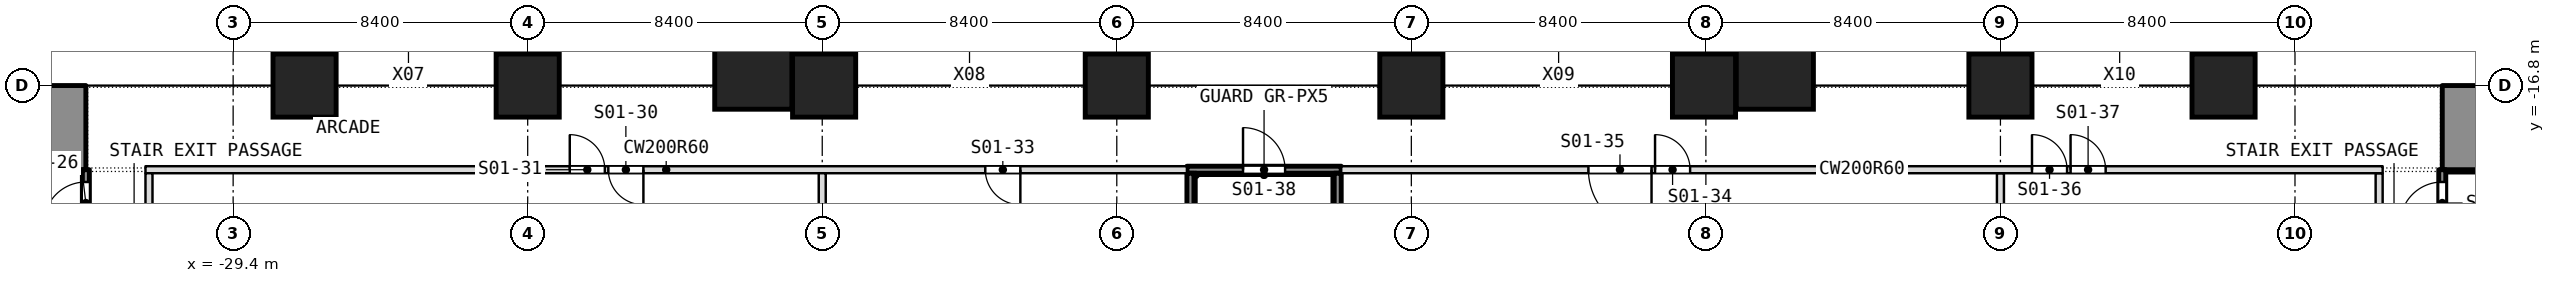
"""IFC4 building model, lengths in metres.
Left out: names, types, materials, properties, quantities, classifications, styles, units other than length and angle.
Written with IfcOpenShell. Run it as: python <this file> out.ifc"""

import sys

from ifc_helpers import new_model, si_unit, direction, frame, frame_2d, origin, origin_2d, place, context, subcontext, project, spatial, rectangle, extrude, element, fill, save


model = new_model("IFC4")
c1 = context("Model", 3, precision=1e-05, world=origin(), true_north=direction((0.0, 1.0)))
c2 = subcontext(c1, "Body", "Model", "MODEL_VIEW")
j1 = project(units=[si_unit("LENGTHUNIT", "METRE"), si_unit("PLANEANGLEUNIT", "RADIAN")], contexts=[c1])
p1 = place(None, origin())
s1 = spatial("IfcSite", under=j1, at=p1, CompositionType="ELEMENT")
p2 = place(p1, origin())
s2 = spatial("IfcBuilding", under=s1, at=p2, CompositionType="ELEMENT")
p3 = place(p2, origin())
s3 = spatial("IfcBuildingStorey", under=s2, at=p3, CompositionType="ELEMENT", Elevation=0.0)
for number, where, z_axis, x_axis in (
    (1, (-21.0, -16.8, -0.3), (0.0, 0.0, 1.0), (1.0, 0.0, 0.0)),
    (2, (-12.546, -16.8, -0.3), (0.0, 0.0, 1.0), (1.0, 0.0, 0.0)),
    (3, (-4.2, -16.8, -0.3), (0.0, 0.0, 1.0), (1.0, 0.0, 0.0)),
    (4, (4.2, -16.8, -0.3), (0.0, 0.0, 1.0), (1.0, 0.0, 0.0)),
    (5, (12.546, -16.8, -0.3), (0.0, 0.0, 1.0), (1.0, 0.0, 0.0)),
    (6, (21.0, -16.8, -0.3), (0.0, 0.0, 1.0), (1.0, 0.0, 0.0)),
    (7, (-27.363, -16.8, -0.3), (0.0, 0.0, 1.0), (1.0, 0.0, 0.0)),
    (8, (27.363, -16.8, -0.3), (0.0, 0.0, 1.0), (1.0, 0.0, 0.0)),
):
    element("IfcColumn", number, at=place(p3, frame(where, z_axis=z_axis, x_axis=x_axis)), inside=s3, PredefinedType="COLUMN", context=c2, shape_type="SweptSolid", body=[
        extrude(rectangle(XDim=1.8, YDim=1.8, at=origin_2d()), origin(), (0.0, 0.0, 1.0), 8.3),
    ])
for number, where, z_axis, x_axis in (
    (9, (-14.566, -16.375, -0.3), (0.0, 0.0, 1.0), (1.0, 0.0, 0.0)),
    (10, (14.566, -16.375, -0.3), (0.0, 0.0, 1.0), (1.0, 0.0, 0.0)),
):
    element("IfcColumn", number, at=place(p3, frame(where, z_axis=z_axis, x_axis=x_axis)), inside=s3, PredefinedType="COLUMN", context=c2, shape_type="SweptSolid", body=[
        extrude(rectangle(XDim=2.2, YDim=2.2, at=origin_2d()), origin(), (0.0, 0.0, 1.0), 8.3),
    ])
for number, where, z_axis, x_axis in (
    (11, (-37.8, -18.0, -0.3), (0.0, 0.0, 1.0), (1.0, 0.0, 0.0)),
    (12, (33.6, -18.0, -0.3), (0.0, 0.0, 1.0), (1.0, 0.0, 0.0)),
):
    element("IfcWall", number, at=place(p3, frame(where, z_axis=z_axis, x_axis=x_axis)), inside=s3, PredefinedType="SOLIDWALL", context=c2, shape_type="SweptSolid", body=[
        extrude(rectangle(XDim=4.2, YDim=2.4, at=frame_2d((2.1, 0.0))), origin(), (0.0, 0.0, 1.0), 8.3),
    ])
p4 = place(p3, frame((33.6, -22.3, 0.0), z_axis=(0.0, 0.0, 1.0), x_axis=(0.0, 1.0, 0.0)))
e13 = element("IfcWall", 13, at=p4, inside=s3, PredefinedType="PARTITIONING", context=c2, shape_type="SweptSolid", body=[
    extrude(rectangle(XDim=3.1, YDim=0.2, at=frame_2d((1.55, 0.0))), origin(), (0.0, 0.0, 1.0), 7.68),
])
p5 = place(p4, frame((1.55, 0.0, 0.0)))
e14 = element("IfcOpeningElement", 14, at=p5, cuts=e13, PredefinedType="OPENING", context=c2, shape_type="SweptSolid", body=[
    extrude(rectangle(XDim=1.2, YDim=2.1, at=frame_2d((0.6, 1.05))), frame((0.0, 0.1, 0.0), z_axis=(0.0, -1.0, 0.0), x_axis=(1.0, 0.0, 0.0)), (0.0, 0.0, 1.0), 0.2),
])
p6 = place(p3, frame((31.8, -22.1, 0.0), z_axis=(0.0, 0.0, 1.0), x_axis=(0.0, 1.0, 0.0)))
e15 = element("IfcWall", 15, at=p6, inside=s3, PredefinedType="PARTITIONING", context=c2, shape_type="SweptSolid", body=[
    extrude(rectangle(XDim=2.8, YDim=0.2, at=frame_2d((1.4, 0.0))), origin(), (0.0, 0.0, 1.0), 7.68),
])
p7 = place(p3, frame((21.0, -25.889, 0.0), z_axis=(0.0, 0.0, 1.0), x_axis=(0.0, 1.0, 0.0)))
e16 = element("IfcWall", 16, at=p7, inside=s3, PredefinedType="PARTITIONING", context=c2, shape_type="SweptSolid", body=[
    extrude(rectangle(XDim=6.589, YDim=0.2, at=frame_2d((3.294, 0.0))), origin(), (0.0, 0.0, 1.0), 7.68),
])
p8 = place(p3, frame((-31.9, -19.2, 0.0), z_axis=(0.0, 0.0, 1.0), x_axis=(1.0, 0.0, 0.0)))
e17 = element("IfcWall", 17, at=p8, inside=s3, PredefinedType="PARTITIONING", context=c2, shape_type="SweptSolid", body=[
    extrude(rectangle(XDim=29.7, YDim=0.2, at=frame_2d((14.85, 0.0))), origin(), (0.0, 0.0, 1.0), 7.68),
])
p9 = place(p8, frame((13.2, 0.0, 0.0)))
e18 = element("IfcOpeningElement", 18, at=p9, cuts=e17, PredefinedType="OPENING", context=c2, shape_type="SweptSolid", body=[
    extrude(rectangle(XDim=1.0, YDim=2.1, at=frame_2d((0.5, 1.05))), frame((0.0, 0.1, 0.0), z_axis=(0.0, -1.0, 0.0), x_axis=(1.0, 0.0, 0.0)), (0.0, 0.0, 1.0), 0.2),
])
p10 = place(p8, frame((12.1, 0.0, 0.0)))
e19 = element("IfcOpeningElement", 19, at=p10, cuts=e17, PredefinedType="OPENING", context=c2, shape_type="SweptSolid", body=[
    extrude(rectangle(XDim=1.0, YDim=2.1, at=frame_2d((0.5, 1.05))), frame((0.0, 0.1, 0.0), z_axis=(0.0, -1.0, 0.0), x_axis=(1.0, 0.0, 0.0)), (0.0, 0.0, 1.0), 0.2),
])
p11 = place(p8, frame((23.95, 0.0, 0.0)))
e20 = element("IfcOpeningElement", 20, at=p11, cuts=e17, PredefinedType="OPENING", context=c2, shape_type="SweptSolid", body=[
    extrude(rectangle(XDim=1.0, YDim=2.1, at=frame_2d((0.5, 1.05))), frame((0.0, 0.1, 0.0), z_axis=(0.0, -1.0, 0.0), x_axis=(1.0, 0.0, 0.0)), (0.0, 0.0, 1.0), 0.2),
])
p12 = place(p3, frame((2.2, -19.2, 0.0), z_axis=(0.0, 0.0, 1.0), x_axis=(1.0, 0.0, 0.0)))
e21 = element("IfcWall", 21, at=p12, inside=s3, PredefinedType="PARTITIONING", context=c2, shape_type="SweptSolid", body=[
    extrude(rectangle(XDim=29.7, YDim=0.2, at=frame_2d((14.85, 0.0))), origin(), (0.0, 0.0, 1.0), 7.68),
])
p13 = place(p12, frame((8.95, 0.0, 0.0)))
e22 = element("IfcOpeningElement", 22, at=p13, cuts=e21, PredefinedType="OPENING", context=c2, shape_type="SweptSolid", body=[
    extrude(rectangle(XDim=1.0, YDim=2.1, at=frame_2d((0.5, 1.05))), frame((0.0, 0.1, 0.0), z_axis=(0.0, -1.0, 0.0), x_axis=(1.0, 0.0, 0.0)), (0.0, 0.0, 1.0), 0.2),
])
p14 = place(p12, frame((7.05, 0.0, 0.0)))
e23 = element("IfcOpeningElement", 23, at=p14, cuts=e21, PredefinedType="OPENING", context=c2, shape_type="SweptSolid", body=[
    extrude(rectangle(XDim=1.8, YDim=2.1, at=frame_2d((0.9, 1.05))), frame((0.0, 0.1, 0.0), z_axis=(0.0, -1.0, 0.0), x_axis=(1.0, 0.0, 0.0)), (0.0, 0.0, 1.0), 0.2),
])
p15 = place(p12, frame((19.7, 0.0, 0.0)))
e24 = element("IfcOpeningElement", 24, at=p15, cuts=e21, PredefinedType="OPENING", context=c2, shape_type="SweptSolid", body=[
    extrude(rectangle(XDim=1.0, YDim=2.1, at=frame_2d((0.5, 1.05))), frame((0.0, 0.1, 0.0), z_axis=(0.0, -1.0, 0.0), x_axis=(1.0, 0.0, 0.0)), (0.0, 0.0, 1.0), 0.2),
])
p16 = place(p12, frame((20.8, 0.0, 0.0)))
e25 = element("IfcOpeningElement", 25, at=p16, cuts=e21, PredefinedType="OPENING", context=c2, shape_type="SweptSolid", body=[
    extrude(rectangle(XDim=1.0, YDim=2.1, at=frame_2d((0.5, 1.05))), frame((0.0, 0.1, 0.0), z_axis=(0.0, -1.0, 0.0), x_axis=(1.0, 0.0, 0.0)), (0.0, 0.0, 1.0), 0.2),
])
p17 = place(p3, frame((-2.2, -19.2, 0.0), z_axis=(0.0, 0.0, 1.0), x_axis=(1.0, 0.0, 0.0)))
e26 = element("IfcWall", 26, at=p17, inside=s3, PredefinedType="PARTITIONING", context=c2, shape_type="SweptSolid", body=[
    extrude(rectangle(XDim=4.4, YDim=0.2, at=frame_2d((2.2, 0.0))), origin(), (0.0, 0.0, 1.0), 7.68),
])
p18 = place(p17, frame((1.6, 0.0, 0.0)))
e27 = element("IfcOpeningElement", 27, at=p18, cuts=e26, PredefinedType="OPENING", context=c2, shape_type="SweptSolid", body=[
    extrude(rectangle(XDim=1.2, YDim=2.1, at=frame_2d((0.6, 1.05))), frame((0.0, 0.1, 0.0), z_axis=(0.0, -1.0, 0.0), x_axis=(1.0, 0.0, 0.0)), (0.0, 0.0, 1.0), 0.2),
])
for number, where, z_axis, x_axis in (
    (28, (2.1, -25.889, 0.0), (0.0, 0.0, 1.0), (0.0, 1.0, 0.0)),
    (29, (-2.1, -25.889, 0.0), (0.0, 0.0, 1.0), (0.0, 1.0, 0.0)),
    (30, (-12.6, -25.889, 0.0), (0.0, 0.0, 1.0), (0.0, 1.0, 0.0)),
):
    element("IfcWall", number, at=place(p3, frame(where, z_axis=z_axis, x_axis=x_axis)), inside=s3, PredefinedType="PARTITIONING", context=c2, shape_type="SweptSolid", body=[
        extrude(rectangle(XDim=6.589, YDim=0.2, at=frame_2d((3.294, 0.0))), origin(), (0.0, 0.0, 1.0), 7.68),
    ])
p19 = place(p3, frame((-31.8, -22.1, 0.0), z_axis=(0.0, 0.0, 1.0), x_axis=(0.0, 1.0, 0.0)))
e31 = element("IfcWall", 31, at=p19, inside=s3, PredefinedType="PARTITIONING", context=c2, shape_type="SweptSolid", body=[
    extrude(rectangle(XDim=2.8, YDim=0.2, at=frame_2d((1.4, 0.0))), origin(), (0.0, 0.0, 1.0), 7.68),
])
p20 = place(p3, frame((-33.6, -22.3, 0.0), z_axis=(0.0, 0.0, 1.0), x_axis=(0.0, 1.0, 0.0)))
e32 = element("IfcWall", 32, at=p20, inside=s3, PredefinedType="PARTITIONING", context=c2, shape_type="SweptSolid", body=[
    extrude(rectangle(XDim=3.1, YDim=0.2, at=frame_2d((1.55, 0.0))), origin(), (0.0, 0.0, 1.0), 7.68),
])
p21 = place(p20, frame((1.55, 0.0, 0.0)))
e33 = element("IfcOpeningElement", 33, at=p21, cuts=e32, PredefinedType="OPENING", context=c2, shape_type="SweptSolid", body=[
    extrude(rectangle(XDim=1.2, YDim=2.1, at=frame_2d((0.6, 1.05))), frame((0.0, 0.1, 0.0), z_axis=(0.0, -1.0, 0.0), x_axis=(1.0, 0.0, 0.0)), (0.0, 0.0, 1.0), 0.2),
])
p22 = place(p5, origin())
e34 = element("IfcDoor", 34, at=p22, inside=s3, OperationType="SINGLE_SWING_LEFT", PredefinedType="DOOR", context=c2, shape_type="SweptSolid", body=[
    extrude(rectangle(XDim=1.2, YDim=2.1, at=frame_2d((0.6, 1.05))), frame((0.0, 0.025, 0.0), z_axis=(0.0, -1.0, 0.0), x_axis=(1.0, 0.0, 0.0)), (0.0, 0.0, 1.0), 0.05),
])
fill(e14, e34)
p23 = place(p9, origin())
e35 = element("IfcDoor", 35, at=p23, inside=s3, OperationType="SINGLE_SWING_LEFT", PredefinedType="DOOR", context=c2, shape_type="SweptSolid", body=[
    extrude(rectangle(XDim=1.0, YDim=2.1, at=frame_2d((0.5, 1.05))), frame((0.0, 0.025, 0.0), z_axis=(0.0, -1.0, 0.0), x_axis=(1.0, 0.0, 0.0)), (0.0, 0.0, 1.0), 0.05),
])
fill(e18, e35)
p24 = place(p10, origin())
e36 = element("IfcDoor", 36, at=p24, inside=s3, OperationType="SINGLE_SWING_LEFT", PredefinedType="DOOR", context=c2, shape_type="SweptSolid", body=[
    extrude(rectangle(XDim=1.0, YDim=2.1, at=frame_2d((0.5, 1.05))), frame((0.0, 0.025, 0.0), z_axis=(0.0, -1.0, 0.0), x_axis=(1.0, 0.0, 0.0)), (0.0, 0.0, 1.0), 0.05),
])
fill(e19, e36)
p25 = place(p11, origin())
e37 = element("IfcDoor", 37, at=p25, inside=s3, OperationType="SINGLE_SWING_RIGHT", PredefinedType="DOOR", context=c2, shape_type="SweptSolid", body=[
    extrude(rectangle(XDim=1.0, YDim=2.1, at=frame_2d((0.5, 1.05))), frame((0.0, 0.025, 0.0), z_axis=(0.0, -1.0, 0.0), x_axis=(1.0, 0.0, 0.0)), (0.0, 0.0, 1.0), 0.05),
])
fill(e20, e37)
p26 = place(p13, origin())
e38 = element("IfcDoor", 38, at=p26, inside=s3, OperationType="SINGLE_SWING_RIGHT", PredefinedType="DOOR", context=c2, shape_type="SweptSolid", body=[
    extrude(rectangle(XDim=1.0, YDim=2.1, at=frame_2d((0.5, 1.05))), frame((0.0, 0.025, 0.0), z_axis=(0.0, -1.0, 0.0), x_axis=(1.0, 0.0, 0.0)), (0.0, 0.0, 1.0), 0.05),
])
fill(e22, e38)
p27 = place(p14, origin())
e39 = element("IfcDoor", 39, at=p27, inside=s3, OperationType="DOUBLE_DOOR_SINGLE_SWING", PredefinedType="DOOR", context=c2, shape_type="SweptSolid", body=[
    extrude(rectangle(XDim=1.8, YDim=2.1, at=frame_2d((0.9, 1.05))), frame((0.0, 0.025, 0.0), z_axis=(0.0, -1.0, 0.0), x_axis=(1.0, 0.0, 0.0)), (0.0, 0.0, 1.0), 0.05),
])
fill(e23, e39)
p28 = place(p15, origin())
e40 = element("IfcDoor", 40, at=p28, inside=s3, OperationType="SINGLE_SWING_LEFT", PredefinedType="DOOR", context=c2, shape_type="SweptSolid", body=[
    extrude(rectangle(XDim=1.0, YDim=2.1, at=frame_2d((0.5, 1.05))), frame((0.0, 0.025, 0.0), z_axis=(0.0, -1.0, 0.0), x_axis=(1.0, 0.0, 0.0)), (0.0, 0.0, 1.0), 0.05),
])
fill(e24, e40)
p29 = place(p16, origin())
e41 = element("IfcDoor", 41, at=p29, inside=s3, OperationType="SINGLE_SWING_LEFT", PredefinedType="DOOR", context=c2, shape_type="SweptSolid", body=[
    extrude(rectangle(XDim=1.0, YDim=2.1, at=frame_2d((0.5, 1.05))), frame((0.0, 0.025, 0.0), z_axis=(0.0, -1.0, 0.0), x_axis=(1.0, 0.0, 0.0)), (0.0, 0.0, 1.0), 0.05),
])
fill(e25, e41)
p30 = place(p18, origin())
e42 = element("IfcDoor", 42, at=p30, inside=s3, OperationType="SINGLE_SWING_RIGHT", PredefinedType="DOOR", context=c2, shape_type="SweptSolid", body=[
    extrude(rectangle(XDim=1.2, YDim=2.1, at=frame_2d((0.6, 1.05))), frame((0.0, 0.025, 0.0), z_axis=(0.0, -1.0, 0.0), x_axis=(1.0, 0.0, 0.0)), (0.0, 0.0, 1.0), 0.05),
])
fill(e27, e42)
p31 = place(p21, origin())
e43 = element("IfcDoor", 43, at=p31, inside=s3, OperationType="SINGLE_SWING_RIGHT", PredefinedType="DOOR", context=c2, shape_type="SweptSolid", body=[
    extrude(rectangle(XDim=1.2, YDim=2.1, at=frame_2d((0.6, 1.05))), frame((0.0, 0.025, 0.0), z_axis=(0.0, -1.0, 0.0), x_axis=(1.0, 0.0, 0.0)), (0.0, 0.0, 1.0), 0.05),
])
fill(e33, e43)
save(model, sys.argv[1])
